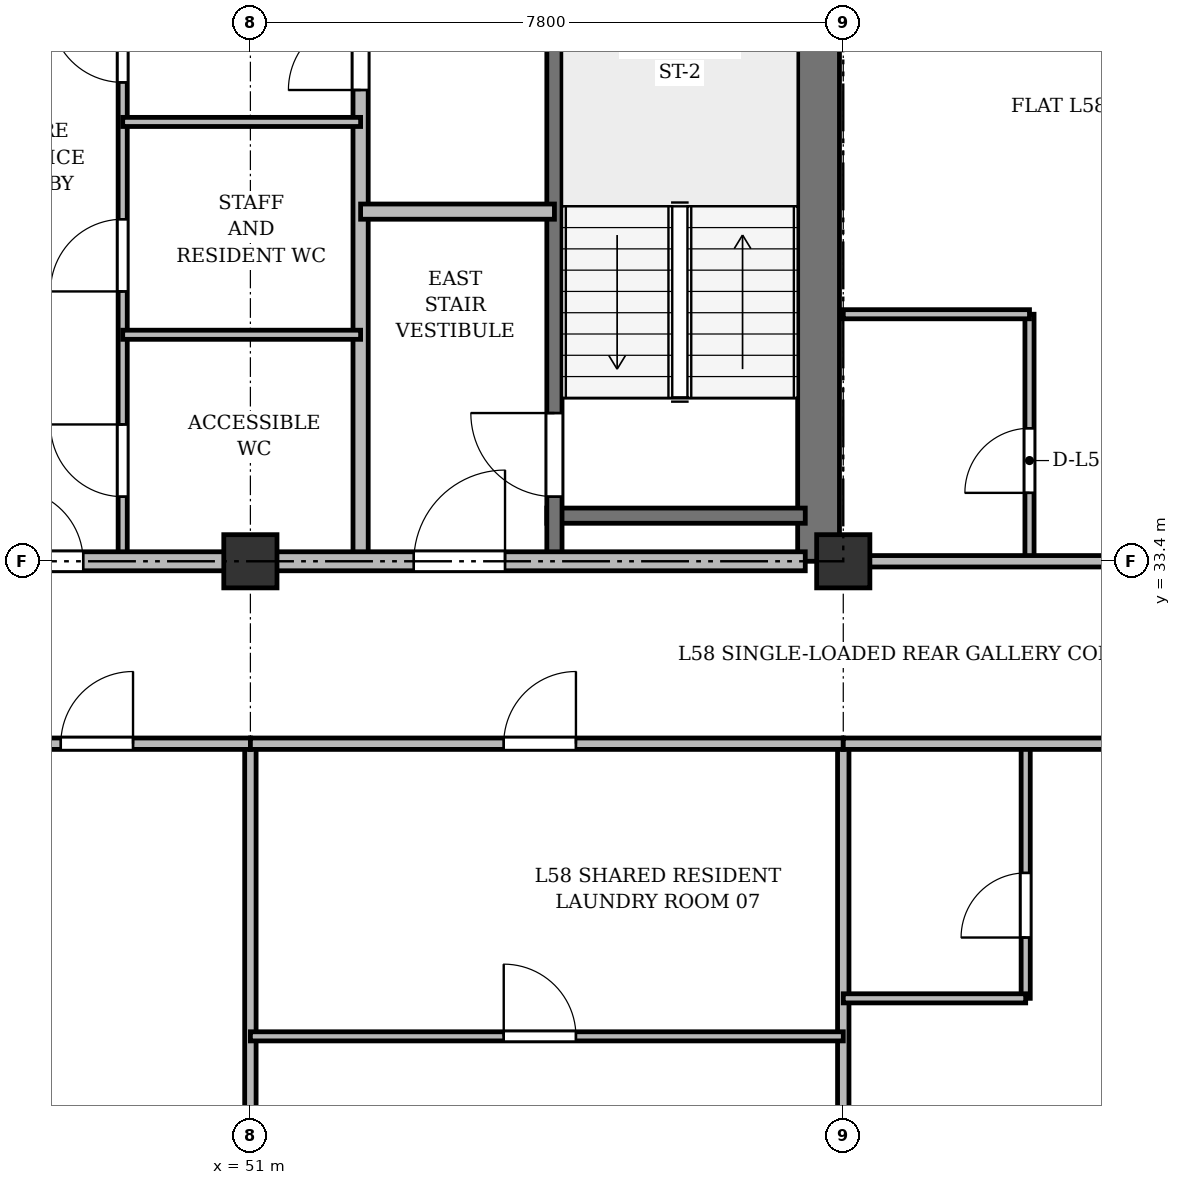
"""IFC4 building model, lengths in metres.
Left out: names, types, materials, properties, quantities, classifications, styles, units other than length and angle.
Written with IfcOpenShell. Run it as: python <this file> out.ifc"""

import sys

from ifc_helpers import new_model, si_unit, direction, frame, frame_2d, origin, origin_2d, place, context, subcontext, project, spatial, rectangle, extrude, source, transform, mapped, element, fill, save


model = new_model("IFC4")
c1 = context("Model", 3, precision=1e-05, world=origin(), true_north=direction((0.0, 1.0)))
c2 = subcontext(c1, "Body", "Model", "MODEL_VIEW")
j1 = project(units=[si_unit("LENGTHUNIT", "METRE"), si_unit("PLANEANGLEUNIT", "RADIAN")], contexts=[c1])
p1 = place(None, origin())
s1 = spatial("IfcSite", under=j1, at=p1, CompositionType="ELEMENT")
p2 = place(p1, origin())
s2 = spatial("IfcBuilding", under=s1, at=p2, CompositionType="ELEMENT")
p3 = place(p2, frame((0.0, 0.0, 222.9)))
s3 = spatial("IfcBuildingStorey", under=s2, at=p3, CompositionType="ELEMENT", Elevation=222.9)
m1 = source(origin(), c2, "Body", "SweptSolid", [
    extrude(rectangle(XDim=0.7, YDim=0.7, at=origin_2d()), origin(), (0.0, 0.0, 1.0), 3.6),
])
for number, where, z_axis, x_axis in (
    (1, (51.0, 33.4, 0.0), (0.0, 0.0, 1.0), (1.0, 0.0, 0.0)),
    (2, (58.8, 33.4, 0.0), (0.0, 0.0, 1.0), (1.0, 0.0, 0.0)),
):
    element("IfcColumn", number, at=place(p3, frame(where, z_axis=z_axis, x_axis=x_axis)), inside=s3, PredefinedType="COLUMN", context=c2, shape_type="MappedRepresentation", body=[
        mapped(m1, transform((0.0, 0.0, 0.0), x_axis=(1.0, 0.0, 0.0), y_axis=(0.0, 1.0, 0.0), z_axis=(0.0, 0.0, 1.0), scale=1.0)),
    ])
p4 = place(p3, frame((58.475, 33.4, 0.0), z_axis=(0.0, 0.0, 1.0), x_axis=(0.0, 1.0, 0.0)))
e3 = element("IfcWall", 3, at=p4, inside=s3, PredefinedType="SHEAR", context=c2, shape_type="SweptSolid", body=[
    extrude(rectangle(XDim=11.55, YDim=0.55, at=frame_2d((5.775, 0.0))), origin(), (0.0, 0.0, 1.0), 3.36),
])
p5 = place(p3, frame((54.9, 34.0, 0.0), z_axis=(0.0, 0.0, 1.0), x_axis=(1.0, 0.0, 0.0)))
e4 = element("IfcWall", 4, at=p5, inside=s3, PredefinedType="SHEAR", context=c2, shape_type="SweptSolid", body=[
    extrude(rectangle(XDim=3.4, YDim=0.2, at=frame_2d((1.7, 0.0))), origin(), (0.0, 0.0, 1.0), 3.36),
])
p6 = place(p3, frame((55.0, 33.4, 0.0), z_axis=(0.0, 0.0, 1.0), x_axis=(0.0, 1.0, 0.0)))
e5 = element("IfcWall", 5, at=p6, inside=s3, PredefinedType="SHEAR", context=c2, shape_type="SweptSolid", body=[
    extrude(rectangle(XDim=11.1, YDim=0.2, at=frame_2d((5.55, 0.0))), origin(), (0.0, 0.0, 1.0), 3.36),
])
p7 = place(p6, frame((0.85, 0.0, 0.0)))
e6 = element("IfcOpeningElement", 6, at=p7, cuts=e5, PredefinedType="OPENING", context=c2, shape_type="SweptSolid", body=[
    extrude(rectangle(XDim=1.1, YDim=2.15, at=frame_2d((0.55, 1.075))), frame((0.0, 0.11, 0.0), z_axis=(0.0, -1.0, 0.0), x_axis=(1.0, 0.0, 0.0)), (0.0, 0.0, 1.0), 0.22),
])
p8 = place(p3, frame((52.45, 33.4, 0.0), z_axis=(0.0, 0.0, 1.0), x_axis=(0.0, 1.0, 0.0)))
e7 = element("IfcWall", 7, at=p8, inside=s3, PredefinedType="PARTITIONING", context=c2, shape_type="SweptSolid", body=[
    extrude(rectangle(XDim=8.65, YDim=0.2, at=frame_2d((4.325, 0.0))), origin(), (0.0, 0.0, 1.0), 2.91),
])
p9 = place(p8, frame((6.2, 0.0, 0.0)))
e8 = element("IfcOpeningElement", 8, at=p9, cuts=e7, PredefinedType="OPENING", context=c2, shape_type="SweptSolid", body=[
    extrude(rectangle(XDim=0.95, YDim=2.15, at=frame_2d((0.475, 1.075))), frame((0.0, 0.11, 0.0), z_axis=(0.0, -1.0, 0.0), x_axis=(1.0, 0.0, 0.0)), (0.0, 0.0, 1.0), 0.22),
])
p10 = place(p3, frame((52.45, 38.0, 0.0), z_axis=(0.0, 0.0, 1.0), x_axis=(1.0, 0.0, 0.0)))
e9 = element("IfcWall", 9, at=p10, inside=s3, PredefinedType="PARTITIONING", context=c2, shape_type="SweptSolid", body=[
    extrude(rectangle(XDim=2.55, YDim=0.2, at=frame_2d((1.275, 0.0))), origin(), (0.0, 0.0, 1.0), 3.36),
])
p11 = place(p3, frame((49.32, 33.4, 0.0), z_axis=(0.0, 0.0, 1.0), x_axis=(0.0, 1.0, 0.0)))
e10 = element("IfcWall", 10, at=p11, inside=s3, PredefinedType="PARTITIONING", context=c2, shape_type="SweptSolid", body=[
    extrude(rectangle(XDim=8.6, YDim=0.12, at=frame_2d((4.3, 0.0))), origin(), (0.0, 0.0, 1.0), 2.91),
])
p12 = place(p11, frame((0.85, 0.0, 0.0)))
e11 = element("IfcOpeningElement", 11, at=p12, cuts=e10, PredefinedType="OPENING", context=c2, shape_type="SweptSolid", body=[
    extrude(rectangle(XDim=0.95, YDim=2.15, at=frame_2d((0.475, 1.075))), frame((0.0, 0.07, 0.0), z_axis=(0.0, -1.0, 0.0), x_axis=(1.0, 0.0, 0.0)), (0.0, 0.0, 1.0), 0.14),
])
p13 = place(p11, frame((3.55, 0.0, 0.0)))
e12 = element("IfcOpeningElement", 12, at=p13, cuts=e10, PredefinedType="OPENING", context=c2, shape_type="SweptSolid", body=[
    extrude(rectangle(XDim=0.95, YDim=2.15, at=frame_2d((0.475, 1.075))), frame((0.0, 0.07, 0.0), z_axis=(0.0, -1.0, 0.0), x_axis=(1.0, 0.0, 0.0)), (0.0, 0.0, 1.0), 0.14),
])
p14 = place(p11, frame((6.3, 0.0, 0.0)))
e13 = element("IfcOpeningElement", 13, at=p14, cuts=e10, PredefinedType="OPENING", context=c2, shape_type="SweptSolid", body=[
    extrude(rectangle(XDim=0.95, YDim=2.15, at=frame_2d((0.475, 1.075))), frame((0.0, 0.07, 0.0), z_axis=(0.0, -1.0, 0.0), x_axis=(1.0, 0.0, 0.0)), (0.0, 0.0, 1.0), 0.14),
])
for number, where, z_axis, x_axis in (
    (14, (49.32, 36.38, 0.0), (0.0, 0.0, 1.0), (1.0, 0.0, 0.0)),
    (15, (49.32, 39.18, 0.0), (0.0, 0.0, 1.0), (1.0, 0.0, 0.0)),
):
    element("IfcWall", number, at=place(p3, frame(where, z_axis=z_axis, x_axis=x_axis)), inside=s3, PredefinedType="PARTITIONING", context=c2, shape_type="SweptSolid", body=[
        extrude(rectangle(XDim=3.13, YDim=0.12, at=frame_2d((1.565, 0.0))), origin(), (0.0, 0.0, 1.0), 2.86),
    ])
p15 = place(p3, frame((47.15, 33.4, 0.0), z_axis=(0.0, 0.0, 1.0), x_axis=(1.0, 0.0, 0.0)))
e16 = element("IfcWall", 16, at=p15, inside=s3, PredefinedType="PARTITIONING", context=c2, shape_type="SweptSolid", body=[
    extrude(rectangle(XDim=11.15, YDim=0.25, at=frame_2d((5.575, 0.0))), origin(), (0.0, 0.0, 1.0), 2.91),
])
p16 = place(p15, frame((0.7, 0.0, 0.0)))
e17 = element("IfcOpeningElement", 17, at=p16, cuts=e16, PredefinedType="OPENING", context=c2, shape_type="SweptSolid", body=[
    extrude(rectangle(XDim=0.95, YDim=2.15, at=frame_2d((0.475, 1.075))), frame((0.0, 0.135, 0.0), z_axis=(0.0, -1.0, 0.0), x_axis=(1.0, 0.0, 0.0)), (0.0, 0.0, 1.0), 0.27),
])
p17 = place(p15, frame((6.0, 0.0, 0.0)))
e18 = element("IfcOpeningElement", 18, at=p17, cuts=e16, PredefinedType="OPENING", context=c2, shape_type="SweptSolid", body=[
    extrude(rectangle(XDim=1.2, YDim=2.15, at=frame_2d((0.6, 1.075))), frame((0.0, 0.135, 0.0), z_axis=(0.0, -1.0, 0.0), x_axis=(1.0, 0.0, 0.0)), (0.0, 0.0, 1.0), 0.27),
])
p18 = place(p3, frame((61.25, 33.4, 0.0), z_axis=(0.0, 0.0, 1.0), x_axis=(0.0, 1.0, 0.0)))
e19 = element("IfcWall", 19, at=p18, inside=s3, PredefinedType="PARTITIONING", context=c2, shape_type="SweptSolid", body=[
    extrude(rectangle(XDim=3.25, YDim=0.12, at=frame_2d((1.625, 0.0))), origin(), (0.0, 0.0, 1.0), 2.91),
])
p19 = place(p18, frame((0.9, 0.0, 0.0)))
e20 = element("IfcOpeningElement", 20, at=p19, cuts=e19, PredefinedType="OPENING", context=c2, shape_type="SweptSolid", body=[
    extrude(rectangle(XDim=0.85, YDim=2.1, at=frame_2d((0.425, 1.05))), frame((0.0, 0.07, 0.0), z_axis=(0.0, -1.0, 0.0), x_axis=(1.0, 0.0, 0.0)), (0.0, 0.0, 1.0), 0.14),
])
p20 = place(p3, frame((58.8, 36.65, 0.0), z_axis=(0.0, 0.0, 1.0), x_axis=(1.0, 0.0, 0.0)))
e21 = element("IfcWall", 21, at=p20, inside=s3, PredefinedType="PARTITIONING", context=c2, shape_type="SweptSolid", body=[
    extrude(rectangle(XDim=2.45, YDim=0.12, at=frame_2d((1.225, 0.0))), origin(), (0.0, 0.0, 1.0), 2.86),
])
p21 = place(p3, frame((58.8, 33.4, 0.0), z_axis=(0.0, 0.0, 1.0), x_axis=(1.0, 0.0, 0.0)))
e22 = element("IfcWall", 22, at=p21, inside=s3, PredefinedType="PARTITIONING", context=c2, shape_type="SweptSolid", body=[
    extrude(rectangle(XDim=7.35, YDim=0.15, at=frame_2d((3.675, 0.0))), origin(), (0.0, 0.0, 1.0), 2.91),
])
p22 = place(p21, frame((4.275, 0.0, 0.0)))
e23 = element("IfcOpeningElement", 23, at=p22, cuts=e22, PredefinedType="OPENING", context=c2, shape_type="SweptSolid", body=[
    extrude(rectangle(XDim=0.95, YDim=2.15, at=frame_2d((0.475, 1.075))), frame((0.0, 0.085, 0.0), z_axis=(0.0, -1.0, 0.0), x_axis=(1.0, 0.0, 0.0)), (0.0, 0.0, 1.0), 0.17),
])
for number, where, z_axis, x_axis in (
    (24, (51.0, 3.625, 0.0), (0.0, 0.0, 1.0), (0.0, 1.0, 0.0)),
    (25, (58.8, 3.625, 0.0), (0.0, 0.0, 1.0), (0.0, 1.0, 0.0)),
):
    element("IfcWall", number, at=place(p3, frame(where, z_axis=z_axis, x_axis=x_axis)), inside=s3, PredefinedType="PARTITIONING", context=c2, shape_type="SweptSolid", body=[
        extrude(rectangle(XDim=27.375, YDim=0.15, at=frame_2d((13.688, 0.0))), origin(), (0.0, 0.0, 1.0), 2.86),
    ])
p23 = place(p3, frame((43.8, 31.0, 0.0), z_axis=(0.0, 0.0, 1.0), x_axis=(1.0, 0.0, 0.0)))
e26 = element("IfcWall", 26, at=p23, inside=s3, PredefinedType="PARTITIONING", context=c2, shape_type="SweptSolid", body=[
    extrude(rectangle(XDim=7.2, YDim=0.15, at=frame_2d((3.6, 0.0))), origin(), (0.0, 0.0, 1.0), 2.86),
])
p24 = place(p23, frame((4.706, 0.0, 0.0)))
e27 = element("IfcOpeningElement", 27, at=p24, cuts=e26, PredefinedType="OPENING", context=c2, shape_type="SweptSolid", body=[
    extrude(rectangle(XDim=0.95, YDim=2.15, at=frame_2d((0.475, 1.075))), frame((0.0, 0.085, 0.0), z_axis=(0.0, -1.0, 0.0), x_axis=(1.0, 0.0, 0.0)), (0.0, 0.0, 1.0), 0.17),
])
p25 = place(p3, frame((51.0, 31.0, 0.0), z_axis=(0.0, 0.0, 1.0), x_axis=(1.0, 0.0, 0.0)))
e28 = element("IfcWall", 28, at=p25, inside=s3, PredefinedType="PARTITIONING", context=c2, shape_type="SweptSolid", body=[
    extrude(rectangle(XDim=7.8, YDim=0.15, at=frame_2d((3.9, 0.0))), origin(), (0.0, 0.0, 1.0), 2.86),
])
p26 = place(p25, frame((3.333, 0.0, 0.0)))
e29 = element("IfcOpeningElement", 29, at=p26, cuts=e28, PredefinedType="OPENING", context=c2, shape_type="SweptSolid", body=[
    extrude(rectangle(XDim=0.95, YDim=2.15, at=frame_2d((0.475, 1.075))), frame((0.0, 0.085, 0.0), z_axis=(0.0, -1.0, 0.0), x_axis=(1.0, 0.0, 0.0)), (0.0, 0.0, 1.0), 0.17),
])
p27 = place(p3, frame((51.0, 27.15, 0.0), z_axis=(0.0, 0.0, 1.0), x_axis=(1.0, 0.0, 0.0)))
e30 = element("IfcWall", 30, at=p27, inside=s3, PredefinedType="PARTITIONING", context=c2, shape_type="SweptSolid", body=[
    extrude(rectangle(XDim=7.8, YDim=0.12, at=frame_2d((3.9, 0.0))), origin(), (0.0, 0.0, 1.0), 2.86),
])
p28 = place(p27, frame((3.333, 0.0, 0.0)))
e31 = element("IfcOpeningElement", 31, at=p28, cuts=e30, PredefinedType="OPENING", context=c2, shape_type="SweptSolid", body=[
    extrude(rectangle(XDim=0.95, YDim=2.15, at=frame_2d((0.475, 1.075))), frame((0.0, 0.07, 0.0), z_axis=(0.0, -1.0, 0.0), x_axis=(1.0, 0.0, 0.0)), (0.0, 0.0, 1.0), 0.14),
])
p29 = place(p3, frame((61.2, 27.65, 0.0), z_axis=(0.0, 0.0, 1.0), x_axis=(0.0, 1.0, 0.0)))
e32 = element("IfcWall", 32, at=p29, inside=s3, PredefinedType="PARTITIONING", context=c2, shape_type="SweptSolid", body=[
    extrude(rectangle(XDim=3.35, YDim=0.12, at=frame_2d((1.675, 0.0))), origin(), (0.0, 0.0, 1.0), 3.36),
])
p30 = place(p29, frame((0.8, 0.0, 0.0)))
e33 = element("IfcOpeningElement", 33, at=p30, cuts=e32, PredefinedType="OPENING", context=c2, shape_type="SweptSolid", body=[
    extrude(rectangle(XDim=0.85, YDim=2.1, at=frame_2d((0.425, 1.05))), frame((0.0, 0.07, 0.0), z_axis=(0.0, -1.0, 0.0), x_axis=(1.0, 0.0, 0.0)), (0.0, 0.0, 1.0), 0.14),
])
p31 = place(p3, frame((58.8, 27.65, 0.0), z_axis=(0.0, 0.0, 1.0), x_axis=(1.0, 0.0, 0.0)))
e34 = element("IfcWall", 34, at=p31, inside=s3, PredefinedType="PARTITIONING", context=c2, shape_type="SweptSolid", body=[
    extrude(rectangle(XDim=2.4, YDim=0.12, at=frame_2d((1.2, 0.0))), origin(), (0.0, 0.0, 1.0), 2.86),
])
p32 = place(p3, frame((58.8, 31.0, 0.0), z_axis=(0.0, 0.0, 1.0), x_axis=(1.0, 0.0, 0.0)))
e35 = element("IfcWall", 35, at=p32, inside=s3, PredefinedType="PARTITIONING", context=c2, shape_type="SweptSolid", body=[
    extrude(rectangle(XDim=7.375, YDim=0.15, at=frame_2d((3.688, 0.0))), origin(), (0.0, 0.0, 1.0), 2.86),
])
p33 = place(p32, frame((4.877, 0.0, 0.0)))
e36 = element("IfcOpeningElement", 36, at=p33, cuts=e35, PredefinedType="OPENING", context=c2, shape_type="SweptSolid", body=[
    extrude(rectangle(XDim=0.95, YDim=2.15, at=frame_2d((0.475, 1.075))), frame((0.0, 0.085, 0.0), z_axis=(0.0, -1.0, 0.0), x_axis=(1.0, 0.0, 0.0)), (0.0, 0.0, 1.0), 0.17),
])
m2 = source(origin(), c2, "Body", "SweptSolid", [
    extrude(rectangle(XDim=1.1, YDim=2.15, at=frame_2d((0.55, 1.075))), frame((0.0, 0.025, 0.0), z_axis=(0.0, -1.0, 0.0), x_axis=(1.0, 0.0, 0.0)), (0.0, 0.0, 1.0), 0.05),
])
p34 = place(p7, origin())
e37 = element("IfcDoor", 37, at=p34, inside=s3, OperationType="SINGLE_SWING_RIGHT", PredefinedType="DOOR", context=c2, shape_type="MappedRepresentation", body=[
    mapped(m2, transform((0.0, 0.0, 0.0), x_axis=(1.0, 0.0, 0.0), y_axis=(0.0, 1.0, 0.0), z_axis=(0.0, 0.0, 1.0), scale=1.0)),
])
fill(e6, e37)
m3 = source(origin(), c2, "Body", "SweptSolid", [
    extrude(rectangle(XDim=0.95, YDim=2.15, at=frame_2d((0.475, 1.075))), frame((0.0, 0.025, 0.0), z_axis=(0.0, -1.0, 0.0), x_axis=(1.0, 0.0, 0.0)), (0.0, 0.0, 1.0), 0.05),
])
p35 = place(p9, origin())
e38 = element("IfcDoor", 38, at=p35, inside=s3, OperationType="SINGLE_SWING_LEFT", PredefinedType="DOOR", context=c2, shape_type="MappedRepresentation", body=[
    mapped(m3, transform((0.0, 0.0, 0.0), x_axis=(1.0, 0.0, 0.0), y_axis=(0.0, 1.0, 0.0), z_axis=(0.0, 0.0, 1.0), scale=1.0)),
])
fill(e8, e38)
p36 = place(p12, origin())
e39 = element("IfcDoor", 39, at=p36, inside=s3, OperationType="SINGLE_SWING_RIGHT", PredefinedType="DOOR", context=c2, shape_type="MappedRepresentation", body=[
    mapped(m3, transform((0.0, 0.0, 0.0), x_axis=(1.0, 0.0, 0.0), y_axis=(0.0, 1.0, 0.0), z_axis=(0.0, 0.0, 1.0), scale=1.0)),
])
fill(e11, e39)
p37 = place(p13, origin())
e40 = element("IfcDoor", 40, at=p37, inside=s3, OperationType="SINGLE_SWING_LEFT", PredefinedType="DOOR", context=c2, shape_type="MappedRepresentation", body=[
    mapped(m3, transform((0.0, 0.0, 0.0), x_axis=(1.0, 0.0, 0.0), y_axis=(0.0, 1.0, 0.0), z_axis=(0.0, 0.0, 1.0), scale=1.0)),
])
fill(e12, e40)
p38 = place(p14, origin())
e41 = element("IfcDoor", 41, at=p38, inside=s3, OperationType="SINGLE_SWING_RIGHT", PredefinedType="DOOR", context=c2, shape_type="MappedRepresentation", body=[
    mapped(m3, transform((0.0, 0.0, 0.0), x_axis=(1.0, 0.0, 0.0), y_axis=(0.0, 1.0, 0.0), z_axis=(0.0, 0.0, 1.0), scale=1.0)),
])
fill(e13, e41)
p39 = place(p16, origin())
e42 = element("IfcDoor", 42, at=p39, inside=s3, OperationType="SINGLE_SWING_LEFT", PredefinedType="DOOR", context=c2, shape_type="MappedRepresentation", body=[
    mapped(m3, transform((0.0, 0.0, 0.0), x_axis=(1.0, 0.0, 0.0), y_axis=(0.0, 1.0, 0.0), z_axis=(0.0, 0.0, 1.0), scale=1.0)),
])
fill(e17, e42)
m4 = source(origin(), c2, "Body", "SweptSolid", [
    extrude(rectangle(XDim=1.2, YDim=2.15, at=frame_2d((0.6, 1.075))), frame((0.0, 0.025, 0.0), z_axis=(0.0, -1.0, 0.0), x_axis=(1.0, 0.0, 0.0)), (0.0, 0.0, 1.0), 0.05),
])
p40 = place(p17, origin())
e43 = element("IfcDoor", 43, at=p40, inside=s3, OperationType="SINGLE_SWING_RIGHT", PredefinedType="DOOR", context=c2, shape_type="MappedRepresentation", body=[
    mapped(m4, transform((0.0, 0.0, 0.0), x_axis=(1.0, 0.0, 0.0), y_axis=(0.0, 1.0, 0.0), z_axis=(0.0, 0.0, 1.0), scale=1.0)),
])
fill(e18, e43)
m5 = source(origin(), c2, "Body", "SweptSolid", [
    extrude(rectangle(XDim=0.85, YDim=2.1, at=frame_2d((0.425, 1.05))), frame((0.0, 0.025, 0.0), z_axis=(0.0, -1.0, 0.0), x_axis=(1.0, 0.0, 0.0)), (0.0, 0.0, 1.0), 0.05),
])
p41 = place(p19, origin())
e44 = element("IfcDoor", 44, at=p41, inside=s3, OperationType="SINGLE_SWING_LEFT", PredefinedType="DOOR", context=c2, shape_type="MappedRepresentation", body=[
    mapped(m5, transform((0.0, 0.0, 0.0), x_axis=(1.0, 0.0, 0.0), y_axis=(0.0, 1.0, 0.0), z_axis=(0.0, 0.0, 1.0), scale=1.0)),
])
fill(e20, e44)
p42 = place(p24, origin())
e45 = element("IfcDoor", 45, at=p42, inside=s3, OperationType="SINGLE_SWING_RIGHT", PredefinedType="DOOR", context=c2, shape_type="MappedRepresentation", body=[
    mapped(m3, transform((0.0, 0.0, 0.0), x_axis=(1.0, 0.0, 0.0), y_axis=(0.0, 1.0, 0.0), z_axis=(0.0, 0.0, 1.0), scale=1.0)),
])
fill(e27, e45)
p43 = place(p26, origin())
e46 = element("IfcDoor", 46, at=p43, inside=s3, OperationType="SINGLE_SWING_RIGHT", PredefinedType="DOOR", context=c2, shape_type="MappedRepresentation", body=[
    mapped(m3, transform((0.0, 0.0, 0.0), x_axis=(1.0, 0.0, 0.0), y_axis=(0.0, 1.0, 0.0), z_axis=(0.0, 0.0, 1.0), scale=1.0)),
])
fill(e29, e46)
p44 = place(p28, origin())
e47 = element("IfcDoor", 47, at=p44, inside=s3, OperationType="SINGLE_SWING_LEFT", PredefinedType="DOOR", context=c2, shape_type="MappedRepresentation", body=[
    mapped(m3, transform((0.0, 0.0, 0.0), x_axis=(1.0, 0.0, 0.0), y_axis=(0.0, 1.0, 0.0), z_axis=(0.0, 0.0, 1.0), scale=1.0)),
])
fill(e31, e47)
p45 = place(p30, origin())
e48 = element("IfcDoor", 48, at=p45, inside=s3, OperationType="SINGLE_SWING_LEFT", PredefinedType="DOOR", context=c2, shape_type="MappedRepresentation", body=[
    mapped(m5, transform((0.0, 0.0, 0.0), x_axis=(1.0, 0.0, 0.0), y_axis=(0.0, 1.0, 0.0), z_axis=(0.0, 0.0, 1.0), scale=1.0)),
])
fill(e33, e48)
save(model, sys.argv[1])
